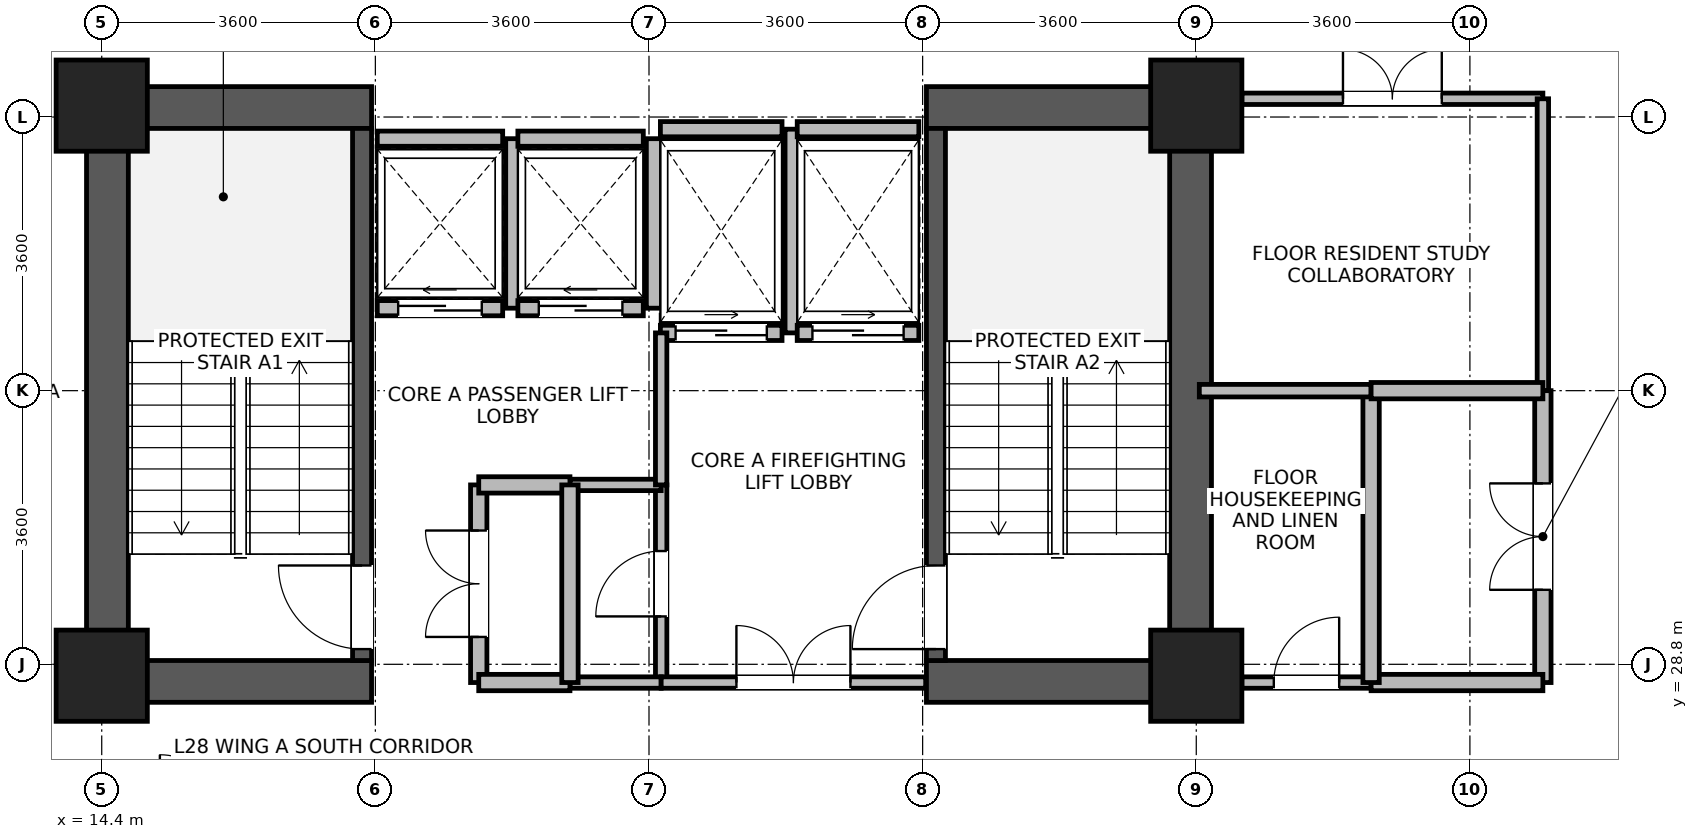
"""IFC4 building model, lengths in metres.
Left out: names, types, materials, properties, quantities, classifications, styles, units other than length and angle.
Written with IfcOpenShell. Run it as: python <this file> out.ifc"""

import sys

from ifc_helpers import new_model, si_unit, direction, frame, frame_2d, origin, origin_2d, place, context, subcontext, project, spatial, rectangle, extrude, source, transform, mapped, element, fill, save


model = new_model("IFC4")
c1 = context("Model", 3, precision=1e-05, world=origin(), true_north=direction((0.0, 1.0)))
c2 = subcontext(c1, "Body", "Model", "MODEL_VIEW")
j1 = project(units=[si_unit("LENGTHUNIT", "METRE"), si_unit("PLANEANGLEUNIT", "RADIAN")], contexts=[c1])
p1 = place(None, origin())
s1 = spatial("IfcSite", under=j1, at=p1, CompositionType="ELEMENT")
p2 = place(p1, origin())
s2 = spatial("IfcBuilding", under=s1, at=p2, CompositionType="ELEMENT")
p3 = place(p2, frame((0.0, 0.0, 111.9)))
s3 = spatial("IfcBuildingStorey", under=s2, at=p3, CompositionType="ELEMENT", Elevation=111.9)
for number, where, z_axis, x_axis in (
    (1, (14.475, 28.3, 0.0), (0.0, 0.0, 1.0), (0.0, 1.0, 0.0)),
    (2, (28.725, 28.3, 0.0), (0.0, 0.0, 1.0), (0.0, 1.0, 0.0)),
):
    element("IfcWall", number, at=place(p3, frame(where, z_axis=z_axis, x_axis=x_axis)), inside=s3, PredefinedType="SHEAR", context=c2, shape_type="SweptSolid", body=[
        extrude(rectangle(XDim=8.1, YDim=0.55, at=frame_2d((4.05, 0.0))), origin(), (0.0, 0.0, 1.0), 3.45),
    ])
for number, where, z_axis, x_axis in (
    (3, (14.75, 28.575, 0.0), (0.0, 0.0, 1.0), (1.0, 0.0, 0.0)),
    (4, (25.25, 28.575, 0.0), (0.0, 0.0, 1.0), (1.0, 0.0, 0.0)),
    (5, (14.75, 36.125, 0.0), (0.0, 0.0, 1.0), (1.0, 0.0, 0.0)),
    (6, (25.25, 36.125, 0.0), (0.0, 0.0, 1.0), (1.0, 0.0, 0.0)),
):
    element("IfcWall", number, at=place(p3, frame(where, z_axis=z_axis, x_axis=x_axis)), inside=s3, PredefinedType="SHEAR", context=c2, shape_type="SweptSolid", body=[
        extrude(rectangle(XDim=3.2, YDim=0.55, at=frame_2d((1.6, 0.0))), origin(), (0.0, 0.0, 1.0), 3.45),
    ])
p4 = place(p3, frame((17.825, 28.85, 0.0), z_axis=(0.0, 0.0, 1.0), x_axis=(0.0, 1.0, 0.0)))
e7 = element("IfcWall", 7, at=p4, inside=s3, PredefinedType="SHEAR", context=c2, shape_type="SweptSolid", body=[
    extrude(rectangle(XDim=7.0, YDim=0.25, at=frame_2d((3.5, 0.0))), origin(), (0.0, 0.0, 1.0), 3.45),
])
p5 = place(p4, frame((0.15, 0.0, 0.0)))
e8 = element("IfcOpeningElement", 8, at=p5, cuts=e7, PredefinedType="OPENING", context=c2, shape_type="SweptSolid", body=[
    extrude(rectangle(XDim=1.1, YDim=2.08, at=frame_2d((0.55, 1.04))), frame((0.0, 0.135, 0.0), z_axis=(0.0, -1.0, 0.0), x_axis=(1.0, 0.0, 0.0)), (0.0, 0.0, 1.0), 0.27),
])
p6 = place(p3, frame((25.375, 28.85, 0.0), z_axis=(0.0, 0.0, 1.0), x_axis=(0.0, 1.0, 0.0)))
e9 = element("IfcWall", 9, at=p6, inside=s3, PredefinedType="SHEAR", context=c2, shape_type="SweptSolid", body=[
    extrude(rectangle(XDim=7.0, YDim=0.25, at=frame_2d((3.5, 0.0))), origin(), (0.0, 0.0, 1.0), 3.45),
])
p7 = place(p6, frame((0.15, 0.0, 0.0)))
e10 = element("IfcOpeningElement", 10, at=p7, cuts=e9, PredefinedType="OPENING", context=c2, shape_type="SweptSolid", body=[
    extrude(rectangle(XDim=1.1, YDim=2.08, at=frame_2d((0.55, 1.04))), frame((0.0, 0.135, 0.0), z_axis=(0.0, -1.0, 0.0), x_axis=(1.0, 0.0, 0.0)), (0.0, 0.0, 1.0), 0.27),
])
m1 = source(origin(), c2, "Body", "SweptSolid", [
    extrude(rectangle(XDim=1.2, YDim=1.2, at=origin_2d()), origin(), (0.0, 0.0, 1.0), 3.7),
])
for number, where, z_axis, x_axis in (
    (11, (14.4, 28.65, 0.0), (0.0, 0.0, 1.0), (1.0, 0.0, 0.0)),
    (12, (14.4, 36.15, 0.0), (0.0, 0.0, 1.0), (1.0, 0.0, 0.0)),
    (13, (28.8, 28.65, 0.0), (0.0, 0.0, 1.0), (1.0, 0.0, 0.0)),
    (14, (28.8, 36.15, 0.0), (0.0, 0.0, 1.0), (1.0, 0.0, 0.0)),
):
    element("IfcColumn", number, at=place(p3, frame(where, z_axis=z_axis, x_axis=x_axis)), inside=s3, PredefinedType="COLUMN", context=c2, shape_type="MappedRepresentation", body=[
        mapped(m1, transform((0.0, 0.0, 0.0), x_axis=(1.0, 0.0, 0.0), y_axis=(0.0, 1.0, 0.0), z_axis=(0.0, 0.0, 1.0), scale=1.0)),
    ])
p8 = place(p3, frame((18.025, 33.485, 0.0), z_axis=(0.0, 0.0, 1.0), x_axis=(1.0, 0.0, 0.0)))
e15 = element("IfcWall", 15, at=p8, inside=s3, PredefinedType="PARTITIONING", context=c2, shape_type="SweptSolid", body=[
    extrude(rectangle(XDim=1.65, YDim=0.2, at=frame_2d((0.825, 0.0))), origin(), (0.0, 0.0, 1.0), 3.43),
])
p9 = place(p8, frame((0.275, 0.0, 0.0)))
e16 = element("IfcOpeningElement", 16, at=p9, cuts=e15, PredefinedType="OPENING", context=c2, shape_type="SweptSolid", body=[
    extrude(rectangle(XDim=1.1, YDim=2.12, at=frame_2d((0.55, 1.06))), frame((0.0, 0.11, 0.0), z_axis=(0.0, -1.0, 0.0), x_axis=(1.0, 0.0, 0.0)), (0.0, 0.0, 1.0), 0.22),
])
p10 = place(p3, frame((18.025, 35.715, 0.0), z_axis=(0.0, 0.0, 1.0), x_axis=(1.0, 0.0, 0.0)))
e17 = element("IfcWall", 17, at=p10, inside=s3, PredefinedType="PARTITIONING", context=c2, shape_type="SweptSolid", body=[
    extrude(rectangle(XDim=1.65, YDim=0.2, at=frame_2d((0.825, 0.0))), origin(), (0.0, 0.0, 1.0), 3.43),
])
p11 = place(p3, frame((19.815, 33.485, 0.0), z_axis=(0.0, 0.0, 1.0), x_axis=(0.0, 1.0, 0.0)))
e18 = element("IfcWall", 18, at=p11, inside=s3, PredefinedType="PARTITIONING", context=c2, shape_type="SweptSolid", body=[
    extrude(rectangle(XDim=2.23, YDim=0.2, at=frame_2d((1.115, 0.0))), origin(), (0.0, 0.0, 1.0), 3.43),
])
p12 = place(p3, frame((19.875, 33.485, 0.0), z_axis=(0.0, 0.0, 1.0), x_axis=(1.0, 0.0, 0.0)))
e19 = element("IfcWall", 19, at=p12, inside=s3, PredefinedType="PARTITIONING", context=c2, shape_type="SweptSolid", body=[
    extrude(rectangle(XDim=1.65, YDim=0.2, at=frame_2d((0.825, 0.0))), origin(), (0.0, 0.0, 1.0), 3.43),
])
p13 = place(p12, frame((0.275, 0.0, 0.0)))
e20 = element("IfcOpeningElement", 20, at=p13, cuts=e19, PredefinedType="OPENING", context=c2, shape_type="SweptSolid", body=[
    extrude(rectangle(XDim=1.1, YDim=2.12, at=frame_2d((0.55, 1.06))), frame((0.0, 0.11, 0.0), z_axis=(0.0, -1.0, 0.0), x_axis=(1.0, 0.0, 0.0)), (0.0, 0.0, 1.0), 0.22),
])
p14 = place(p3, frame((19.875, 35.715, 0.0), z_axis=(0.0, 0.0, 1.0), x_axis=(1.0, 0.0, 0.0)))
e21 = element("IfcWall", 21, at=p14, inside=s3, PredefinedType="PARTITIONING", context=c2, shape_type="SweptSolid", body=[
    extrude(rectangle(XDim=1.65, YDim=0.2, at=frame_2d((0.825, 0.0))), origin(), (0.0, 0.0, 1.0), 3.43),
])
p15 = place(p3, frame((21.665, 33.485, 0.0), z_axis=(0.0, 0.0, 1.0), x_axis=(0.0, 1.0, 0.0)))
e22 = element("IfcWall", 22, at=p15, inside=s3, PredefinedType="PARTITIONING", context=c2, shape_type="SweptSolid", body=[
    extrude(rectangle(XDim=2.23, YDim=0.2, at=frame_2d((1.115, 0.0))), origin(), (0.0, 0.0, 1.0), 3.43),
])
p16 = place(p3, frame((21.75, 33.16, 0.0), z_axis=(0.0, 0.0, 1.0), x_axis=(1.0, 0.0, 0.0)))
e23 = element("IfcWall", 23, at=p16, inside=s3, PredefinedType="PARTITIONING", context=c2, shape_type="SweptSolid", body=[
    extrude(rectangle(XDim=1.6, YDim=0.2, at=frame_2d((0.8, 0.0))), origin(), (0.0, 0.0, 1.0), 3.43),
])
p17 = place(p16, frame((0.2, 0.0, 0.0)))
e24 = element("IfcOpeningElement", 24, at=p17, cuts=e23, PredefinedType="OPENING", context=c2, shape_type="SweptSolid", body=[
    extrude(rectangle(XDim=1.2, YDim=2.12, at=frame_2d((0.6, 1.06))), frame((0.0, 0.11, 0.0), z_axis=(0.0, -1.0, 0.0), x_axis=(1.0, 0.0, 0.0)), (0.0, 0.0, 1.0), 0.22),
])
p18 = place(p3, frame((21.75, 35.84, 0.0), z_axis=(0.0, 0.0, 1.0), x_axis=(1.0, 0.0, 0.0)))
e25 = element("IfcWall", 25, at=p18, inside=s3, PredefinedType="PARTITIONING", context=c2, shape_type="SweptSolid", body=[
    extrude(rectangle(XDim=1.6, YDim=0.2, at=frame_2d((0.8, 0.0))), origin(), (0.0, 0.0, 1.0), 2.43),
])
p19 = place(p3, frame((23.49, 33.16, 0.0), z_axis=(0.0, 0.0, 1.0), x_axis=(0.0, 1.0, 0.0)))
e26 = element("IfcWall", 26, at=p19, inside=s3, PredefinedType="PARTITIONING", context=c2, shape_type="SweptSolid", body=[
    extrude(rectangle(XDim=2.68, YDim=0.2, at=frame_2d((1.34, 0.0))), origin(), (0.0, 0.0, 1.0), 3.43),
])
p20 = place(p3, frame((23.55, 33.16, 0.0), z_axis=(0.0, 0.0, 1.0), x_axis=(1.0, 0.0, 0.0)))
e27 = element("IfcWall", 27, at=p20, inside=s3, PredefinedType="PARTITIONING", context=c2, shape_type="SweptSolid", body=[
    extrude(rectangle(XDim=1.6, YDim=0.2, at=frame_2d((0.8, 0.0))), origin(), (0.0, 0.0, 1.0), 3.43),
])
p21 = place(p20, frame((0.2, 0.0, 0.0)))
e28 = element("IfcOpeningElement", 28, at=p21, cuts=e27, PredefinedType="OPENING", context=c2, shape_type="SweptSolid", body=[
    extrude(rectangle(XDim=1.2, YDim=2.12, at=frame_2d((0.6, 1.06))), frame((0.0, 0.11, 0.0), z_axis=(0.0, -1.0, 0.0), x_axis=(1.0, 0.0, 0.0)), (0.0, 0.0, 1.0), 0.22),
])
p22 = place(p3, frame((23.55, 35.84, 0.0), z_axis=(0.0, 0.0, 1.0), x_axis=(1.0, 0.0, 0.0)))
e29 = element("IfcWall", 29, at=p22, inside=s3, PredefinedType="PARTITIONING", context=c2, shape_type="SweptSolid", body=[
    extrude(rectangle(XDim=1.6, YDim=0.2, at=frame_2d((0.8, 0.0))), origin(), (0.0, 0.0, 1.0), 2.43),
])
p23 = place(p3, frame((29.4, 36.24, 0.0), z_axis=(0.0, 0.0, 1.0), x_axis=(1.0, 0.0, 0.0)))
e30 = element("IfcWall", 30, at=p23, inside=s3, PredefinedType="PARTITIONING", context=c2, shape_type="SweptSolid", body=[
    extrude(rectangle(XDim=3.96, YDim=0.15, at=frame_2d((1.98, 0.0))), origin(), (0.0, 0.0, 1.0), 2.78),
])
p24 = place(p23, frame((1.33, 0.0, 0.0)))
e31 = element("IfcOpeningElement", 31, at=p24, cuts=e30, PredefinedType="OPENING", context=c2, shape_type="SweptSolid", body=[
    extrude(rectangle(XDim=1.3, YDim=2.12, at=frame_2d((0.65, 1.06))), frame((0.0, 0.085, 0.0), z_axis=(0.0, -1.0, 0.0), x_axis=(1.0, 0.0, 0.0)), (0.0, 0.0, 1.0), 0.17),
])
p25 = place(p3, frame((33.36, 32.4, 0.0), z_axis=(0.0, 0.0, 1.0), x_axis=(0.0, 1.0, 0.0)))
e32 = element("IfcWall", 32, at=p25, inside=s3, PredefinedType="PARTITIONING", context=c2, shape_type="SweptSolid", body=[
    extrude(rectangle(XDim=3.84, YDim=0.15, at=frame_2d((1.92, 0.0))), origin(), (0.0, 0.0, 1.0), 3.43),
])
p26 = place(p3, frame((33.36, 28.56, 0.0), z_axis=(0.0, 0.0, 1.0), x_axis=(0.0, 1.0, 0.0)))
e33 = element("IfcWall", 33, at=p26, inside=s3, PredefinedType="PARTITIONING", context=c2, shape_type="SweptSolid", body=[
    extrude(rectangle(XDim=3.84, YDim=0.215, at=frame_2d((1.92, 0.0))), origin(), (0.0, 0.0, 1.0), 3.43),
])
p27 = place(p26, frame((1.22, 0.0, 0.0)))
e34 = element("IfcOpeningElement", 34, at=p27, cuts=e33, PredefinedType="OPENING", context=c2, shape_type="SweptSolid", body=[
    extrude(rectangle(XDim=1.4, YDim=2.15, at=frame_2d((0.7, 1.075))), frame((0.0, 0.118, 0.0), z_axis=(0.0, -1.0, 0.0), x_axis=(1.0, 0.0, 0.0)), (0.0, 0.0, 1.0), 0.235),
])
p28 = place(p3, frame((19.36, 28.56, 0.0), z_axis=(0.0, 0.0, 1.0), x_axis=(0.0, 1.0, 0.0)))
e35 = element("IfcWall", 35, at=p28, inside=s3, PredefinedType="PARTITIONING", context=c2, shape_type="SweptSolid", body=[
    extrude(rectangle(XDim=2.6, YDim=0.215, at=frame_2d((1.3, 0.0))), origin(), (0.0, 0.0, 1.0), 3.43),
])
p29 = place(p28, frame((0.6, 0.0, 0.0)))
e36 = element("IfcOpeningElement", 36, at=p29, cuts=e35, PredefinedType="OPENING", context=c2, shape_type="SweptSolid", body=[
    extrude(rectangle(XDim=1.4, YDim=2.15, at=frame_2d((0.7, 1.075))), frame((0.0, 0.118, 0.0), z_axis=(0.0, -1.0, 0.0), x_axis=(1.0, 0.0, 0.0)), (0.0, 0.0, 1.0), 0.235),
])
p30 = place(p3, frame((21.76, 28.56, 0.0), z_axis=(0.0, 0.0, 1.0), x_axis=(0.0, 1.0, 0.0)))
e37 = element("IfcWall", 37, at=p30, inside=s3, PredefinedType="PARTITIONING", context=c2, shape_type="SweptSolid", body=[
    extrude(rectangle(XDim=2.6, YDim=0.15, at=frame_2d((1.3, 0.0))), origin(), (0.0, 0.0, 1.0), 3.43),
])
p31 = place(p30, frame((0.87, 0.0, 0.0)))
e38 = element("IfcOpeningElement", 38, at=p31, cuts=e37, PredefinedType="OPENING", context=c2, shape_type="SweptSolid", body=[
    extrude(rectangle(XDim=0.86, YDim=2.02, at=frame_2d((0.43, 1.01))), frame((0.0, 0.085, 0.0), z_axis=(0.0, -1.0, 0.0), x_axis=(1.0, 0.0, 0.0)), (0.0, 0.0, 1.0), 0.17),
])
p32 = place(p3, frame((29.4, 28.56, 0.0), z_axis=(0.0, 0.0, 1.0), x_axis=(1.0, 0.0, 0.0)))
e39 = element("IfcWall", 39, at=p32, inside=s3, PredefinedType="PARTITIONING", context=c2, shape_type="SweptSolid", body=[
    extrude(rectangle(XDim=1.7, YDim=0.15, at=frame_2d((0.85, 0.0))), origin(), (0.0, 0.0, 1.0), 2.78),
])
p33 = place(p32, frame((0.42, 0.0, 0.0)))
e40 = element("IfcOpeningElement", 40, at=p33, cuts=e39, PredefinedType="OPENING", context=c2, shape_type="SweptSolid", body=[
    extrude(rectangle(XDim=0.86, YDim=2.02, at=frame_2d((0.43, 1.01))), frame((0.0, 0.085, 0.0), z_axis=(0.0, -1.0, 0.0), x_axis=(1.0, 0.0, 0.0)), (0.0, 0.0, 1.0), 0.17),
])
p34 = place(p3, frame((31.1, 28.56, 0.0), z_axis=(0.0, 0.0, 1.0), x_axis=(1.0, 0.0, 0.0)))
e41 = element("IfcWall", 41, at=p34, inside=s3, PredefinedType="PARTITIONING", context=c2, shape_type="SweptSolid", body=[
    extrude(rectangle(XDim=2.26, YDim=0.215, at=frame_2d((1.13, 0.0))), origin(), (0.0, 0.0, 1.0), 2.78),
])
p35 = place(p3, frame((20.56, 28.56, 0.0), z_axis=(0.0, 0.0, 1.0), x_axis=(1.0, 0.0, 0.0)))
e42 = element("IfcWall", 42, at=p35, inside=s3, PredefinedType="PARTITIONING", context=c2, shape_type="SweptSolid", body=[
    extrude(rectangle(XDim=1.2, YDim=0.15, at=frame_2d((0.6, 0.0))), origin(), (0.0, 0.0, 1.0), 2.43),
])
p36 = place(p3, frame((20.56, 31.16, 0.0), z_axis=(0.0, 0.0, 1.0), x_axis=(1.0, 0.0, 0.0)))
e43 = element("IfcWall", 43, at=p36, inside=s3, PredefinedType="PARTITIONING", context=c2, shape_type="SweptSolid", body=[
    extrude(rectangle(XDim=1.2, YDim=0.15, at=frame_2d((0.6, 0.0))), origin(), (0.0, 0.0, 1.0), 3.43),
])
p37 = place(p3, frame((19.36, 28.56, 0.0), z_axis=(0.0, 0.0, 1.0), x_axis=(1.0, 0.0, 0.0)))
e44 = element("IfcWall", 44, at=p37, inside=s3, PredefinedType="PARTITIONING", context=c2, shape_type="SweptSolid", body=[
    extrude(rectangle(XDim=1.2, YDim=0.215, at=frame_2d((0.6, 0.0))), origin(), (0.0, 0.0, 1.0), 2.43),
])
p38 = place(p3, frame((19.36, 31.16, 0.0), z_axis=(0.0, 0.0, 1.0), x_axis=(1.0, 0.0, 0.0)))
e45 = element("IfcWall", 45, at=p38, inside=s3, PredefinedType="PARTITIONING", context=c2, shape_type="SweptSolid", body=[
    extrude(rectangle(XDim=1.2, YDim=0.215, at=frame_2d((0.6, 0.0))), origin(), (0.0, 0.0, 1.0), 3.43),
])
p39 = place(p3, frame((31.1, 28.56, 0.0), z_axis=(0.0, 0.0, 1.0), x_axis=(0.0, 1.0, 0.0)))
e46 = element("IfcWall", 46, at=p39, inside=s3, PredefinedType="PARTITIONING", context=c2, shape_type="SweptSolid", body=[
    extrude(rectangle(XDim=3.84, YDim=0.215, at=frame_2d((1.92, 0.0))), origin(), (0.0, 0.0, 1.0), 3.43),
])
p40 = place(p3, frame((21.76, 28.56, 0.0), z_axis=(0.0, 0.0, 1.0), x_axis=(1.0, 0.0, 0.0)))
e47 = element("IfcWall", 47, at=p40, inside=s3, PredefinedType="PARTITIONING", context=c2, shape_type="SweptSolid", body=[
    extrude(rectangle(XDim=3.48, YDim=0.15, at=frame_2d((1.74, 0.0))), origin(), (0.0, 0.0, 1.0), 2.43),
])
p41 = place(p40, frame((0.99, 0.0, 0.0)))
e48 = element("IfcOpeningElement", 48, at=p41, cuts=e47, PredefinedType="OPENING", context=c2, shape_type="SweptSolid", body=[
    extrude(rectangle(XDim=1.5, YDim=2.1, at=frame_2d((0.75, 1.05))), frame((0.0, 0.085, 0.0), z_axis=(0.0, -1.0, 0.0), x_axis=(1.0, 0.0, 0.0)), (0.0, 0.0, 1.0), 0.17),
])
p42 = place(p3, frame((20.56, 28.56, 0.0), z_axis=(0.0, 0.0, 1.0), x_axis=(0.0, 1.0, 0.0)))
e49 = element("IfcWall", 49, at=p42, inside=s3, PredefinedType="PARTITIONING", context=c2, shape_type="SweptSolid", body=[
    extrude(rectangle(XDim=2.6, YDim=0.215, at=frame_2d((1.3, 0.0))), origin(), (0.0, 0.0, 1.0), 3.43),
])
p43 = place(p3, frame((28.84, 32.4, 0.0), z_axis=(0.0, 0.0, 1.0), x_axis=(1.0, 0.0, 0.0)))
e50 = element("IfcWall", 50, at=p43, inside=s3, PredefinedType="PARTITIONING", context=c2, shape_type="SweptSolid", body=[
    extrude(rectangle(XDim=2.26, YDim=0.165, at=frame_2d((1.13, 0.0))), origin(), (0.0, 0.0, 1.0), 3.43),
])
p44 = place(p3, frame((31.1, 32.4, 0.0), z_axis=(0.0, 0.0, 1.0), x_axis=(1.0, 0.0, 0.0)))
e51 = element("IfcWall", 51, at=p44, inside=s3, PredefinedType="PARTITIONING", context=c2, shape_type="SweptSolid", body=[
    extrude(rectangle(XDim=2.26, YDim=0.215, at=frame_2d((1.13, 0.0))), origin(), (0.0, 0.0, 1.0), 3.43),
])
p45 = place(p3, frame((21.76, 31.16, 0.0), z_axis=(0.0, 0.0, 1.0), x_axis=(0.0, 1.0, 0.0)))
e52 = element("IfcWall", 52, at=p45, inside=s3, PredefinedType="PARTITIONING", context=c2, shape_type="SweptSolid", body=[
    extrude(rectangle(XDim=2.0, YDim=0.15, at=frame_2d((1.0, 0.0))), origin(), (0.0, 0.0, 1.0), 3.43),
])
p46 = place(p5, origin())
e53 = element("IfcDoor", 53, at=p46, inside=s3, OperationType="SINGLE_SWING_RIGHT", PredefinedType="DOOR", context=c2, shape_type="SweptSolid", body=[
    extrude(rectangle(XDim=1.1, YDim=2.08, at=frame_2d((0.55, 1.04))), frame((0.0, 0.025, 0.0), z_axis=(0.0, -1.0, 0.0), x_axis=(1.0, 0.0, 0.0)), (0.0, 0.0, 1.0), 0.05),
])
fill(e8, e53)
p47 = place(p7, origin())
e54 = element("IfcDoor", 54, at=p47, inside=s3, OperationType="SINGLE_SWING_LEFT", PredefinedType="DOOR", context=c2, shape_type="SweptSolid", body=[
    extrude(rectangle(XDim=1.1, YDim=2.08, at=frame_2d((0.55, 1.04))), frame((0.0, 0.025, 0.0), z_axis=(0.0, -1.0, 0.0), x_axis=(1.0, 0.0, 0.0)), (0.0, 0.0, 1.0), 0.05),
])
fill(e10, e54)
p48 = place(p9, origin())
e55 = element("IfcDoor", 55, at=p48, inside=s3, OperationType="SLIDING_TO_LEFT", PredefinedType="DOOR", context=c2, shape_type="SweptSolid", body=[
    extrude(rectangle(XDim=1.1, YDim=2.12, at=frame_2d((0.55, 1.06))), frame((0.0, 0.025, 0.0), z_axis=(0.0, -1.0, 0.0), x_axis=(1.0, 0.0, 0.0)), (0.0, 0.0, 1.0), 0.05),
])
fill(e16, e55)
p49 = place(p13, origin())
e56 = element("IfcDoor", 56, at=p49, inside=s3, OperationType="SLIDING_TO_LEFT", PredefinedType="DOOR", context=c2, shape_type="SweptSolid", body=[
    extrude(rectangle(XDim=1.1, YDim=2.12, at=frame_2d((0.55, 1.06))), frame((0.0, 0.025, 0.0), z_axis=(0.0, -1.0, 0.0), x_axis=(1.0, 0.0, 0.0)), (0.0, 0.0, 1.0), 0.05),
])
fill(e20, e56)
p50 = place(p17, origin())
e57 = element("IfcDoor", 57, at=p50, inside=s3, OperationType="SLIDING_TO_RIGHT", PredefinedType="DOOR", context=c2, shape_type="SweptSolid", body=[
    extrude(rectangle(XDim=1.2, YDim=2.12, at=frame_2d((0.6, 1.06))), frame((0.0, 0.025, 0.0), z_axis=(0.0, -1.0, 0.0), x_axis=(1.0, 0.0, 0.0)), (0.0, 0.0, 1.0), 0.05),
])
fill(e24, e57)
p51 = place(p21, origin())
e58 = element("IfcDoor", 58, at=p51, inside=s3, OperationType="SLIDING_TO_RIGHT", PredefinedType="DOOR", context=c2, shape_type="SweptSolid", body=[
    extrude(rectangle(XDim=1.2, YDim=2.12, at=frame_2d((0.6, 1.06))), frame((0.0, 0.025, 0.0), z_axis=(0.0, -1.0, 0.0), x_axis=(1.0, 0.0, 0.0)), (0.0, 0.0, 1.0), 0.05),
])
fill(e28, e58)
p52 = place(p24, origin())
e59 = element("IfcDoor", 59, at=p52, inside=s3, OperationType="DOUBLE_DOOR_SINGLE_SWING", PredefinedType="DOOR", context=c2, shape_type="SweptSolid", body=[
    extrude(rectangle(XDim=1.3, YDim=2.12, at=frame_2d((0.65, 1.06))), frame((0.0, 0.025, 0.0), z_axis=(0.0, -1.0, 0.0), x_axis=(1.0, 0.0, 0.0)), (0.0, 0.0, 1.0), 0.05),
])
fill(e31, e59)
p53 = place(p27, origin())
e60 = element("IfcDoor", 60, at=p53, inside=s3, OperationType="DOUBLE_DOOR_SINGLE_SWING", PredefinedType="DOOR", context=c2, shape_type="SweptSolid", body=[
    extrude(rectangle(XDim=1.4, YDim=2.15, at=frame_2d((0.7, 1.075))), frame((0.0, 0.025, 0.0), z_axis=(0.0, -1.0, 0.0), x_axis=(1.0, 0.0, 0.0)), (0.0, 0.0, 1.0), 0.05),
])
fill(e34, e60)
p54 = place(p29, origin())
e61 = element("IfcDoor", 61, at=p54, inside=s3, OperationType="DOUBLE_DOOR_SINGLE_SWING", PredefinedType="DOOR", context=c2, shape_type="SweptSolid", body=[
    extrude(rectangle(XDim=1.4, YDim=2.15, at=frame_2d((0.7, 1.075))), frame((0.0, 0.025, 0.0), z_axis=(0.0, -1.0, 0.0), x_axis=(1.0, 0.0, 0.0)), (0.0, 0.0, 1.0), 0.05),
])
fill(e36, e61)
p55 = place(p31, origin())
e62 = element("IfcDoor", 62, at=p55, inside=s3, OperationType="SINGLE_SWING_LEFT", PredefinedType="DOOR", context=c2, shape_type="SweptSolid", body=[
    extrude(rectangle(XDim=0.86, YDim=2.02, at=frame_2d((0.43, 1.01))), frame((0.0, 0.025, 0.0), z_axis=(0.0, -1.0, 0.0), x_axis=(1.0, 0.0, 0.0)), (0.0, 0.0, 1.0), 0.05),
])
fill(e38, e62)
p56 = place(p33, origin())
e63 = element("IfcDoor", 63, at=p56, inside=s3, OperationType="SINGLE_SWING_RIGHT", PredefinedType="DOOR", context=c2, shape_type="SweptSolid", body=[
    extrude(rectangle(XDim=0.86, YDim=2.02, at=frame_2d((0.43, 1.01))), frame((0.0, 0.025, 0.0), z_axis=(0.0, -1.0, 0.0), x_axis=(1.0, 0.0, 0.0)), (0.0, 0.0, 1.0), 0.05),
])
fill(e40, e63)
p57 = place(p41, origin())
e64 = element("IfcDoor", 64, at=p57, inside=s3, OperationType="DOUBLE_DOOR_SINGLE_SWING", PredefinedType="DOOR", context=c2, shape_type="SweptSolid", body=[
    extrude(rectangle(XDim=1.5, YDim=2.1, at=frame_2d((0.75, 1.05))), frame((0.0, 0.025, 0.0), z_axis=(0.0, -1.0, 0.0), x_axis=(1.0, 0.0, 0.0)), (0.0, 0.0, 1.0), 0.05),
])
fill(e48, e64)
save(model, sys.argv[1])
